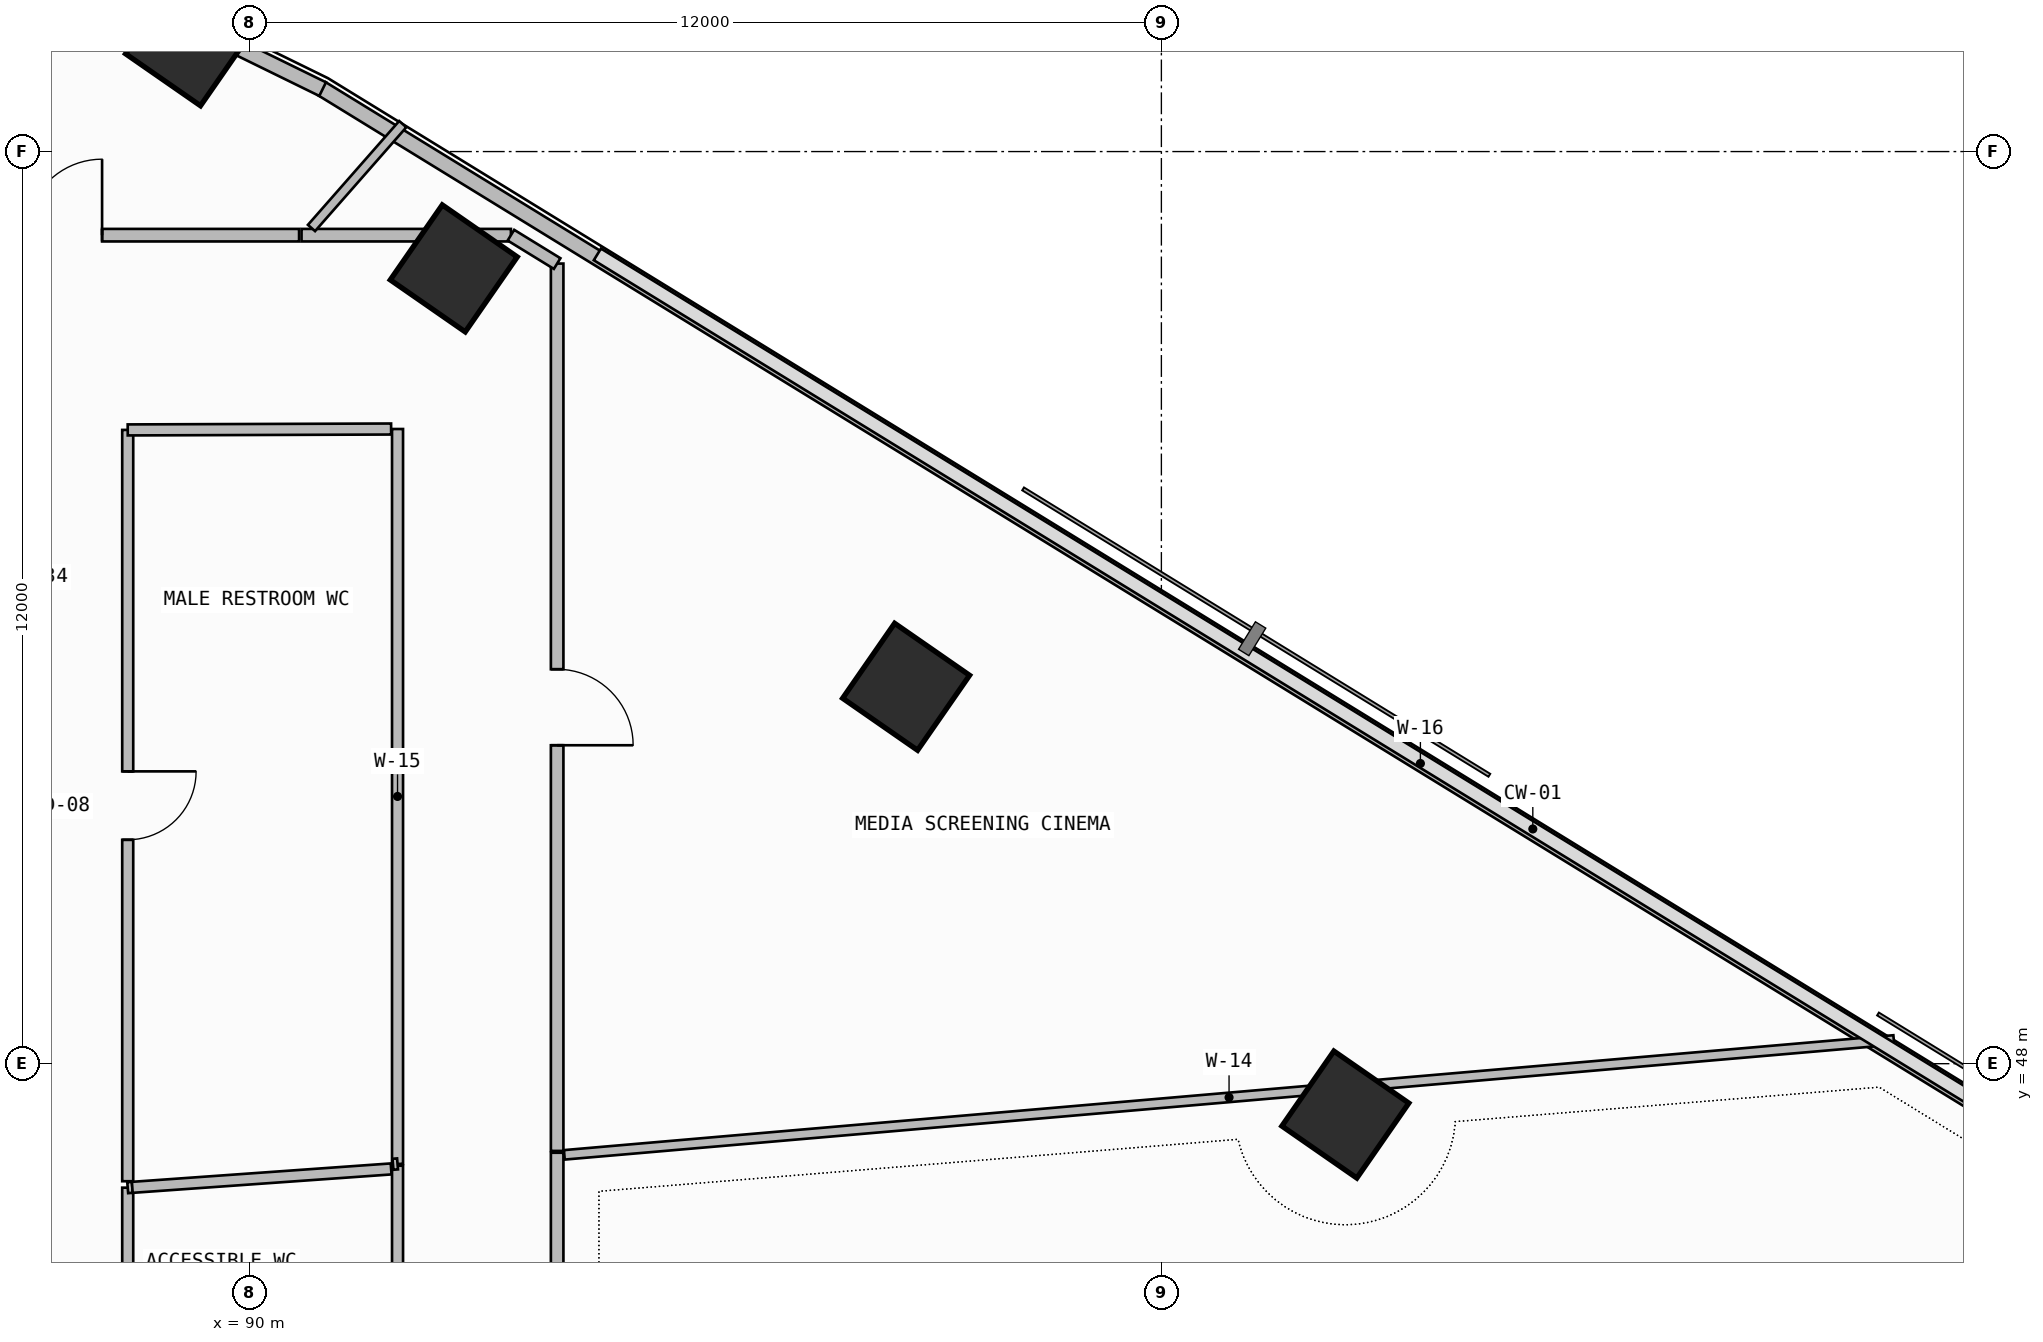
"""IFC4 building model, lengths in metres.
Left out: names, types, materials, properties, quantities, classifications, styles, units other than length and angle.
Written with IfcOpenShell. Run it as: python <this file> out.ifc"""

import sys

from ifc_helpers import new_model, si_unit, direction, frame, frame_2d, origin, origin_2d, place, context, subcontext, project, spatial, rectangle, extrude, element, fill, save


model = new_model("IFC4")
c1 = context("Model", 3, precision=1e-05, world=origin(), true_north=direction((0.0, 1.0)))
c2 = subcontext(c1, "Body", "Model", "MODEL_VIEW")
j1 = project(units=[si_unit("LENGTHUNIT", "METRE"), si_unit("PLANEANGLEUNIT", "RADIAN")], contexts=[c1])
p1 = place(None, origin())
s1 = spatial("IfcSite", under=j1, at=p1, CompositionType="ELEMENT")
p2 = place(p1, origin())
s2 = spatial("IfcBuilding", under=s1, at=p2, CompositionType="ELEMENT")
p3 = place(p2, frame((0.0, 0.0, 120.9)))
s3 = spatial("IfcBuildingStorey", under=s2, at=p3, CompositionType="ELEMENT", Elevation=120.9)
for number, where, z_axis, x_axis in (
    (1, (104.42, 47.331, 0.0), (0.0, 0.0, 1.0), (0.57, 0.822, 0.0)),
    (2, (98.641, 52.958, 0.0), (0.0, 0.0, 1.0), (0.57, 0.822, 0.0)),
    (3, (92.69, 58.463, 0.0), (0.0, 0.0, 1.0), (0.57, 0.822, 0.0)),
    (4, (89.207, 61.438, 0.0), (0.0, 0.0, 1.0), (0.57, 0.822, 0.0)),
):
    element("IfcColumn", number, at=place(p3, frame(where, z_axis=z_axis, x_axis=x_axis)), inside=s3, PredefinedType="COLUMN", context=c2, shape_type="SweptSolid", body=[
        extrude(rectangle(XDim=1.2, YDim=1.2, at=origin_2d()), origin(), (0.0, 0.0, 1.0), 3.6),
    ])
p4 = place(p3, frame((119.865, 43.07, 0.0), z_axis=(0.0, 0.0, 1.0), x_axis=(-0.852110824326, 0.52336138859, 0.0)))
e5 = element("IfcWall", 5, at=p4, inside=s3, PredefinedType="PARAPET", context=c2, shape_type="SweptSolid", body=[
    extrude(rectangle(XDim=33.932, YDim=0.2, at=frame_2d((16.966, 0.0))), origin(), (0.0, 0.0, 1.0), 1.15),
])
p5 = place(p3, frame((90.964, 60.822, 0.0), z_axis=(0.0, 0.0, 1.0), x_axis=(-0.898000468284, 0.439994498787, 0.0)))
e6 = element("IfcWall", 6, at=p5, inside=s3, PredefinedType="PARAPET", context=c2, shape_type="SweptSolid", body=[
    extrude(rectangle(XDim=1.423, YDim=0.2, at=frame_2d((0.712, 0.0))), origin(), (0.0, 0.0, 1.0), 1.15),
])
p6 = place(p3, frame((91.95, 46.657, 0.0), z_axis=(0.0, 0.0, 1.0), x_axis=(0.0, -1.0, 0.0)))
e7 = element("IfcWall", 7, at=p6, inside=s3, PredefinedType="PARTITIONING", context=c2, shape_type="SweptSolid", body=[
    extrude(rectangle(XDim=5.754, YDim=0.145, at=frame_2d((2.877, 0.0))), origin(), (0.0, 0.0, 1.0), 2.725),
])
p7 = place(p6, frame((2.402, 0.0, 0.0)))
e8 = element("IfcOpeningElement", 8, at=p7, cuts=e7, PredefinedType="OPENING", context=c2, shape_type="SweptSolid", body=[
    extrude(rectangle(XDim=0.95, YDim=2.15, at=frame_2d((0.475, 1.075))), frame((0.0, 0.083, 0.0), z_axis=(0.0, -1.0, 0.0), x_axis=(1.0, 0.0, 0.0)), (0.0, 0.0, 1.0), 0.165),
])
p8 = place(p3, frame((88.4, 42.128, 0.0), z_axis=(0.0, 0.0, 1.0), x_axis=(0.0, 1.0, 0.0)))
e9 = element("IfcWall", 9, at=p8, inside=s3, PredefinedType="PARTITIONING", context=c2, shape_type="SweptSolid", body=[
    extrude(rectangle(XDim=4.241, YDim=0.145, at=frame_2d((2.12, 0.0))), origin(), (0.0, 0.0, 1.0), 2.725),
])
p9 = place(p3, frame((88.4, 46.369, 0.0), z_axis=(0.0, 0.0, 1.0), x_axis=(0.996711382833, 0.081033445759, 0.0)))
e10 = element("IfcWall", 10, at=p9, inside=s3, PredefinedType="PARTITIONING", context=c2, shape_type="SweptSolid", body=[
    extrude(rectangle(XDim=0.06, YDim=0.145, at=frame_2d((0.03, 0.0))), origin(), (0.0, 0.0, 1.0), 3.34),
])
p10 = place(p3, frame((88.46, 46.373, 0.0), z_axis=(0.0, 0.0, 1.0), x_axis=(0.997475371103, 0.071013266669, 0.0)))
e11 = element("IfcWall", 11, at=p10, inside=s3, PredefinedType="PARTITIONING", context=c2, shape_type="SweptSolid", body=[
    extrude(rectangle(XDim=3.414, YDim=0.145, at=frame_2d((1.707, 0.0))), origin(), (0.0, 0.0, 1.0), 3.34),
])
p11 = place(p3, frame((94.05, 40.077, 0.0), z_axis=(0.0, 0.0, 1.0), x_axis=(0.0, 1.0, 0.0)))
e12 = element("IfcWall", 12, at=p11, inside=s3, PredefinedType="PARTITIONING", context=c2, shape_type="SweptSolid", body=[
    extrude(rectangle(XDim=6.751, YDim=0.165, at=frame_2d((3.375, 0.0))), origin(), (0.0, 0.0, 1.0), 2.725),
])
p12 = place(p11, frame((2.875, 0.0, 0.0)))
e13 = element("IfcOpeningElement", 13, at=p12, cuts=e12, PredefinedType="OPENING", context=c2, shape_type="SweptSolid", body=[
    extrude(rectangle(XDim=1.0, YDim=2.2, at=frame_2d((0.5, 1.1))), frame((0.0, 0.093, 0.0), z_axis=(0.0, -1.0, 0.0), x_axis=(1.0, 0.0, 0.0)), (0.0, 0.0, 1.0), 0.185),
])
p13 = place(p3, frame((94.145, 46.801, 0.0), z_axis=(0.0, 0.0, 1.0), x_axis=(0.996288543636, 0.086076348786, 0.0)))
e14 = element("IfcWall", 14, at=p13, inside=s3, PredefinedType="PARTITIONING", context=c2, shape_type="SweptSolid", body=[
    extrude(rectangle(XDim=17.557, YDim=0.125, at=frame_2d((8.778, 0.0))), origin(), (0.0, 0.0, 1.0), 2.725),
])
p14 = place(p3, frame((94.05, 46.852, 0.0), z_axis=(0.0, 0.0, 1.0), x_axis=(0.0, 1.0, 0.0)))
e15 = element("IfcWall", 15, at=p14, inside=s3, PredefinedType="PARTITIONING", context=c2, shape_type="SweptSolid", body=[
    extrude(rectangle(XDim=11.674, YDim=0.165, at=frame_2d((5.837, 0.0))), origin(), (0.0, 0.0, 1.0), 2.725),
])
p15 = place(p14, frame((5.337, 0.0, 0.0)))
e16 = element("IfcOpeningElement", 16, at=p15, cuts=e15, PredefinedType="OPENING", context=c2, shape_type="SweptSolid", body=[
    extrude(rectangle(XDim=1.0, YDim=2.2, at=frame_2d((0.5, 1.1))), frame((0.0, 0.093, 0.0), z_axis=(0.0, -1.0, 0.0), x_axis=(1.0, 0.0, 0.0)), (0.0, 0.0, 1.0), 0.185),
])
p16 = place(p3, frame((93.442, 58.9, 0.0), z_axis=(0.0, 0.0, 1.0), x_axis=(-1.0, 0.0, 0.0)))
e17 = element("IfcWall", 17, at=p16, inside=s3, PredefinedType="PARTITIONING", context=c2, shape_type="SweptSolid", body=[
    extrude(rectangle(XDim=2.755, YDim=0.165, at=frame_2d((1.377, 0.0))), origin(), (0.0, 0.0, 1.0), 2.725),
])
p17 = place(p3, frame((94.05, 58.527, 0.0), z_axis=(0.0, 0.0, 1.0), x_axis=(-0.852256862618, 0.523123541928, 0.0)))
e18 = element("IfcWall", 18, at=p17, inside=s3, PredefinedType="PARTITIONING", context=c2, shape_type="SweptSolid", body=[
    extrude(rectangle(XDim=0.714, YDim=0.165, at=frame_2d((0.357, 0.0))), origin(), (0.0, 0.0, 1.0), 3.34),
])
p18 = place(p3, frame((90.818, 58.994, 0.0), z_axis=(0.0, 0.0, 1.0), x_axis=(0.6599952554, 0.751269767027, 0.0)))
e19 = element("IfcWall", 19, at=p18, inside=s3, PredefinedType="PARTITIONING", context=c2, shape_type="SweptSolid", body=[
    extrude(rectangle(XDim=1.819, YDim=0.125, at=frame_2d((0.909, 0.0))), origin(), (0.0, 0.0, 1.0), 2.725),
])
p19 = place(p3, frame((88.4, 46.454, 0.0), z_axis=(0.0, 0.0, 1.0), x_axis=(0.0, 1.0, 0.0)))
e20 = element("IfcWall", 20, at=p19, inside=s3, PredefinedType="PARTITIONING", context=c2, shape_type="SweptSolid", body=[
    extrude(rectangle(XDim=9.884, YDim=0.145, at=frame_2d((4.942, 0.0))), origin(), (0.0, 0.0, 1.0), 2.725),
])
p20 = place(p19, frame((4.492, 0.0, 0.0)))
e21 = element("IfcOpeningElement", 21, at=p20, cuts=e20, PredefinedType="OPENING", context=c2, shape_type="SweptSolid", body=[
    extrude(rectangle(XDim=0.9, YDim=2.1, at=frame_2d((0.45, 1.05))), frame((0.0, 0.083, 0.0), z_axis=(0.0, -1.0, 0.0), x_axis=(1.0, 0.0, 0.0)), (0.0, 0.0, 1.0), 0.165),
])
p21 = place(p3, frame((91.95, 56.35, 0.0), z_axis=(0.0, 0.0, 1.0), x_axis=(0.0, -1.0, 0.0)))
e22 = element("IfcWall", 22, at=p21, inside=s3, PredefinedType="PARTITIONING", context=c2, shape_type="SweptSolid", body=[
    extrude(rectangle(XDim=9.668, YDim=0.145, at=frame_2d((4.834, 0.0))), origin(), (0.0, 0.0, 1.0), 2.725),
])
p22 = place(p3, frame((88.4, 56.338, 0.0), z_axis=(0.0, 0.0, 1.0), x_axis=(0.999994282871, 0.003381453017, 0.0)))
e23 = element("IfcWall", 23, at=p22, inside=s3, PredefinedType="PARTITIONING", context=c2, shape_type="SweptSolid", body=[
    extrude(rectangle(XDim=3.466, YDim=0.145, at=frame_2d((1.733, 0.0))), origin(), (0.0, 0.0, 1.0), 2.875),
])
p23 = place(p3, frame((91.95, 46.682, 0.0), z_axis=(0.0, 0.0, 1.0), x_axis=(-0.996711382833, -0.081033445759, 0.0)))
e24 = element("IfcWall", 24, at=p23, inside=s3, PredefinedType="PARTITIONING", context=c2, shape_type="SweptSolid", body=[
    extrude(rectangle(XDim=0.06, YDim=0.145, at=frame_2d((0.03, 0.0))), origin(), (0.0, 0.0, 1.0), 3.34),
])
p24 = place(p3, frame((90.655, 58.9, 0.0), z_axis=(0.0, 0.0, 1.0), x_axis=(-1.0, 0.0, 0.0)))
e25 = element("IfcWall", 25, at=p24, inside=s3, PredefinedType="PARTITIONING", context=c2, shape_type="SweptSolid", body=[
    extrude(rectangle(XDim=12.272, YDim=0.165, at=frame_2d((6.136, 0.0))), origin(), (0.0, 0.0, 1.0), 2.725),
])
p25 = place(p24, frame((2.592, 0.0, 0.0)))
e26 = element("IfcOpeningElement", 26, at=p25, cuts=e25, PredefinedType="OPENING", context=c2, shape_type="SweptSolid", body=[
    extrude(rectangle(XDim=1.0, YDim=2.2, at=frame_2d((0.5, 1.1))), frame((0.0, 0.093, 0.0), z_axis=(0.0, -1.0, 0.0), x_axis=(1.0, 0.0, 0.0)), (0.0, 0.0, 1.0), 0.185),
])
p26 = place(p15, frame((1.0, 0.0, 0.0), z_axis=(0.0, 0.0, 1.0), x_axis=(-1.0, 0.0, 0.0)))
e27 = element("IfcDoor", 27, at=p26, inside=s3, OperationType="SINGLE_SWING_RIGHT", PredefinedType="DOOR", context=c2, shape_type="SweptSolid", body=[
    extrude(rectangle(XDim=1.0, YDim=2.2, at=frame_2d((0.5, 1.1))), frame((0.0, 0.025, 0.0), z_axis=(0.0, -1.0, 0.0), x_axis=(1.0, 0.0, 0.0)), (0.0, 0.0, 1.0), 0.05),
])
fill(e16, e27)
p27 = place(p20, frame((0.9, 0.0, 0.0), z_axis=(0.0, 0.0, 1.0), x_axis=(-1.0, 0.0, 0.0)))
e28 = element("IfcDoor", 28, at=p27, inside=s3, OperationType="SINGLE_SWING_LEFT", PredefinedType="DOOR", context=c2, shape_type="SweptSolid", body=[
    extrude(rectangle(XDim=0.9, YDim=2.1, at=frame_2d((0.45, 1.05))), frame((0.0, 0.025, 0.0), z_axis=(0.0, -1.0, 0.0), x_axis=(1.0, 0.0, 0.0)), (0.0, 0.0, 1.0), 0.05),
])
fill(e21, e28)
p28 = place(p25, frame((1.0, 0.0, 0.0), z_axis=(0.0, 0.0, 1.0), x_axis=(-1.0, 0.0, 0.0)))
e29 = element("IfcDoor", 29, at=p28, inside=s3, OperationType="SINGLE_SWING_RIGHT", PredefinedType="DOOR", context=c2, shape_type="SweptSolid", body=[
    extrude(rectangle(XDim=1.0, YDim=2.2, at=frame_2d((0.5, 1.1))), frame((0.0, 0.025, 0.0), z_axis=(0.0, -1.0, 0.0), x_axis=(1.0, 0.0, 0.0)), (0.0, 0.0, 1.0), 0.05),
])
fill(e26, e29)
save(model, sys.argv[1])
